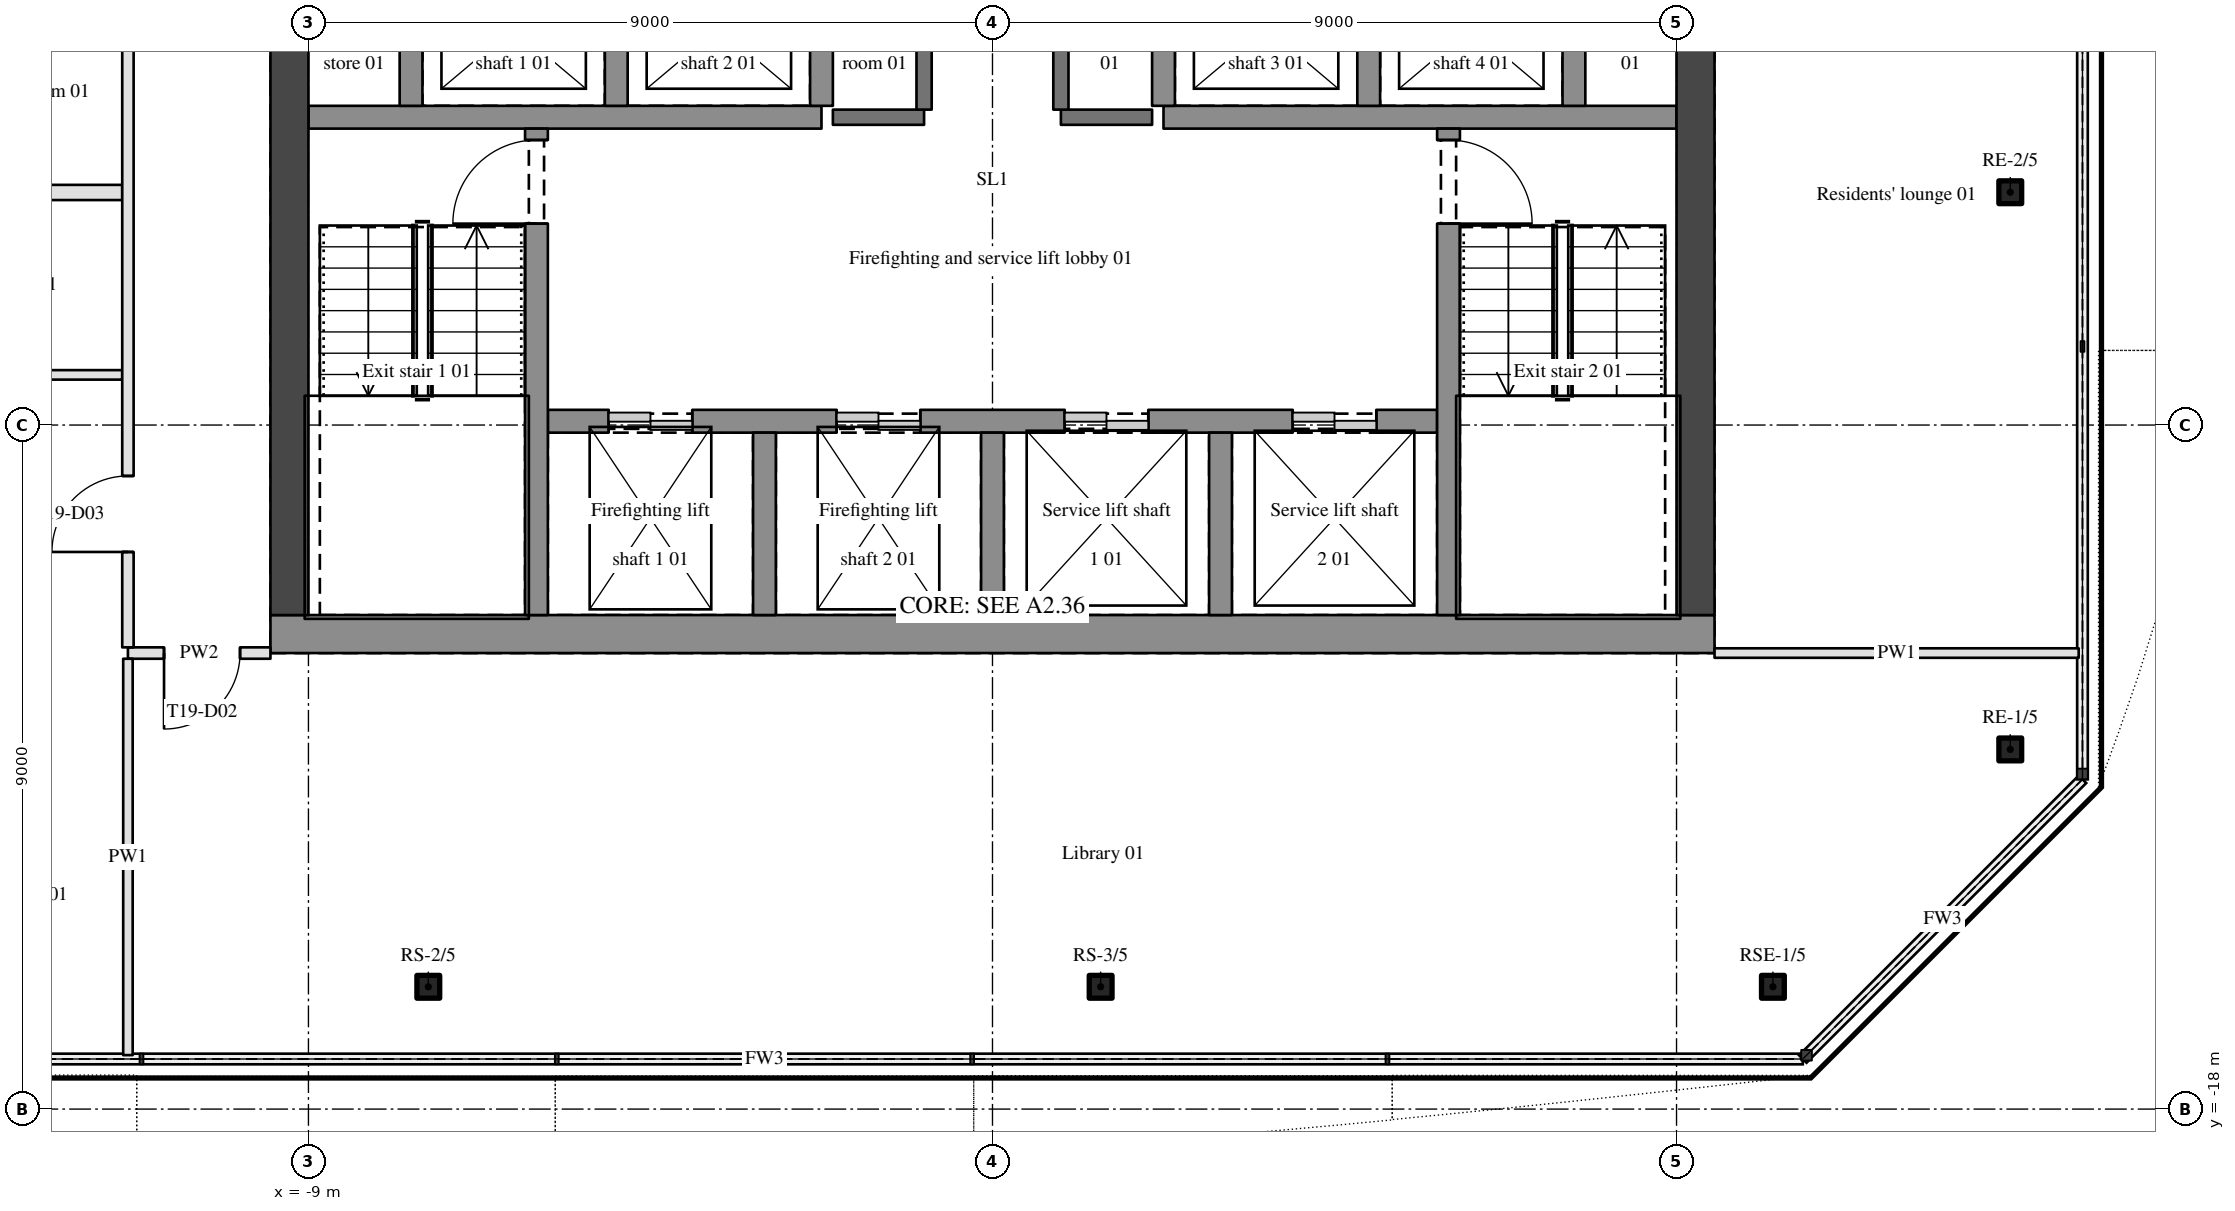
"""IFC4 building model, lengths in metres.
Left out: names, types, materials, properties, quantities, classifications, styles, units other than length and angle.
Written with IfcOpenShell. Run it as: python <this file> out.ifc"""

import sys

from ifc_helpers import new_model, si_unit, direction, frame, frame_2d, origin, origin_2d, place, context, subcontext, project, spatial, rectangle, hollow_rectangle, extrude, element, fill, save


model = new_model("IFC4")
c1 = context("Model", 3, precision=1e-05, world=origin(), true_north=direction((0.0, 1.0)))
c2 = subcontext(c1, "Body", "Model", "MODEL_VIEW")
j1 = project(units=[si_unit("LENGTHUNIT", "METRE"), si_unit("PLANEANGLEUNIT", "RADIAN")], contexts=[c1])
p1 = place(None, origin())
s1 = spatial("IfcSite", under=j1, at=p1, CompositionType="ELEMENT")
p2 = place(p1, origin())
s2 = spatial("IfcBuilding", under=s1, at=p2, CompositionType="ELEMENT")
p3 = place(p2, frame((0.0, 0.0, 251.85)))
s3 = spatial("IfcBuildingStorey", under=s2, at=p3, CompositionType="ELEMENT", Elevation=251.85)
for number, where, z_axis, x_axis in (
    (1, (-7.423, -16.391, 0.0), (0.0, 0.0, 1.0), (1.0, 0.0, 0.0)),
    (2, (1.423, -16.391, 0.0), (0.0, 0.0, 1.0), (1.0, 0.0, 0.0)),
    (3, (10.268, -16.391, 0.0), (0.0, 0.0, 1.0), (1.0, 0.0, 0.0)),
    (4, (13.391, -13.268, 0.0), (0.0, 0.0, 1.0), (1.0, 0.0, 0.0)),
    (5, (13.391, -5.937, 0.0), (0.0, 0.0, 1.0), (1.0, 0.0, 0.0)),
):
    element("IfcColumn", number, at=place(p3, frame(where, z_axis=z_axis, x_axis=x_axis)), inside=s3, PredefinedType="COLUMN", context=c2, shape_type="SweptSolid", body=[
        extrude(hollow_rectangle(XDim=0.3, YDim=0.3, WallThickness=0.02, InnerFilletRadius=0.03, OuterFilletRadius=0.05, at=origin_2d()), origin(), (0.0, 0.0, 1.0), 3.15),
    ])
p4 = place(p3, frame((-9.5, -11.75, 0.0), z_axis=(0.0, 0.0, 1.0), x_axis=(1.0, 0.0, 0.0)))
e6 = element("IfcWall", 6, at=p4, inside=s3, PredefinedType="SHEAR", context=c2, shape_type="SweptSolid", body=[
    extrude(rectangle(XDim=19.0, YDim=0.5, at=frame_2d((9.5, 0.0))), origin(), (0.0, 0.0, 1.0), 3.15),
])
p5 = place(p3, frame((-9.25, -11.5, 0.0), z_axis=(0.0, 0.0, 1.0), x_axis=(0.0, 1.0, 0.0)))
e7 = element("IfcWall", 7, at=p5, inside=s3, PredefinedType="SHEAR", context=c2, shape_type="SweptSolid", body=[
    extrude(rectangle(XDim=11.65, YDim=0.5, at=frame_2d((5.825, 0.0))), origin(), (0.0, 0.0, 1.0), 3.15),
])
p6 = place(p5, frame((9.4, 0.0, 0.0)))
e8 = element("IfcOpeningElement", 8, at=p6, cuts=e7, PredefinedType="OPENING", context=c2, shape_type="SweptSolid", body=[
    extrude(rectangle(XDim=1.8, YDim=2.1, at=frame_2d((0.9, 1.05))), frame((0.0, 0.26, 0.0), z_axis=(0.0, -1.0, 0.0), x_axis=(1.0, 0.0, 0.0)), (0.0, 0.0, 1.0), 0.52),
])
p7 = place(p3, frame((9.25, -11.5, 0.0), z_axis=(0.0, 0.0, 1.0), x_axis=(0.0, 1.0, 0.0)))
e9 = element("IfcWall", 9, at=p7, inside=s3, PredefinedType="SHEAR", context=c2, shape_type="SweptSolid", body=[
    extrude(rectangle(XDim=11.65, YDim=0.5, at=frame_2d((5.825, 0.0))), origin(), (0.0, 0.0, 1.0), 3.15),
])
p8 = place(p3, frame((-9.5, -12.0, 0.0), z_axis=(0.0, 0.0, 1.0), x_axis=(-1.0, 0.0, 0.0)))
e10 = element("IfcWall", 10, at=p8, inside=s3, PredefinedType="PARTITIONING", context=c2, shape_type="SweptSolid", body=[
    extrude(rectangle(XDim=1.875, YDim=0.15, at=frame_2d((0.938, 0.0))), origin(), (0.0, 0.0, 1.0), 2.21),
])
p9 = place(p8, frame((0.4, 0.0, 0.0)))
e11 = element("IfcOpeningElement", 11, at=p9, cuts=e10, PredefinedType="OPENING", context=c2, shape_type="SweptSolid", body=[
    extrude(rectangle(XDim=1.0, YDim=2.1, at=frame_2d((0.5, 1.05))), frame((0.0, 0.085, 0.0), z_axis=(0.0, -1.0, 0.0), x_axis=(1.0, 0.0, 0.0)), (0.0, 0.0, 1.0), 0.17),
])
p10 = place(p3, frame((9.5, -12.0, 0.0), z_axis=(0.0, 0.0, 1.0), x_axis=(1.0, 0.0, 0.0)))
e12 = element("IfcWall", 12, at=p10, inside=s3, PredefinedType="PARTITIONING", context=c2, shape_type="SweptSolid", body=[
    extrude(rectangle(XDim=4.791, YDim=0.125, at=frame_2d((2.396, 0.0))), origin(), (0.0, 0.0, 1.0), 2.21),
])
p11 = place(p3, frame((-5.85, -8.95, 0.0), z_axis=(0.0, 0.0, 1.0), x_axis=(1.0, 0.0, 0.0)))
e13 = element("IfcWall", 13, at=p11, inside=s3, PredefinedType="SHEAR", context=c2, shape_type="SweptSolid", body=[
    extrude(rectangle(XDim=11.7, YDim=0.3, at=frame_2d((5.85, 0.0))), origin(), (0.0, 0.0, 1.0), 3.15),
])
p12 = place(p11, frame((0.8, 0.0, 0.0)))
e14 = element("IfcOpeningElement", 14, at=p12, cuts=e13, PredefinedType="OPENING", context=c2, shape_type="SweptSolid", body=[
    extrude(rectangle(XDim=1.1, YDim=2.1, at=frame_2d((0.55, 1.05))), frame((0.0, 0.16, 0.0), z_axis=(0.0, -1.0, 0.0), x_axis=(1.0, 0.0, 0.0)), (0.0, 0.0, 1.0), 0.32),
])
p13 = place(p11, frame((3.8, 0.0, 0.0)))
e15 = element("IfcOpeningElement", 15, at=p13, cuts=e13, PredefinedType="OPENING", context=c2, shape_type="SweptSolid", body=[
    extrude(rectangle(XDim=1.1, YDim=2.1, at=frame_2d((0.55, 1.05))), frame((0.0, 0.16, 0.0), z_axis=(0.0, -1.0, 0.0), x_axis=(1.0, 0.0, 0.0)), (0.0, 0.0, 1.0), 0.32),
])
p14 = place(p11, frame((6.8, 0.0, 0.0)))
e16 = element("IfcOpeningElement", 16, at=p14, cuts=e13, PredefinedType="OPENING", context=c2, shape_type="SweptSolid", body=[
    extrude(rectangle(XDim=1.1, YDim=2.1, at=frame_2d((0.55, 1.05))), frame((0.0, 0.16, 0.0), z_axis=(0.0, -1.0, 0.0), x_axis=(1.0, 0.0, 0.0)), (0.0, 0.0, 1.0), 0.32),
])
p15 = place(p11, frame((9.8, 0.0, 0.0)))
e17 = element("IfcOpeningElement", 17, at=p15, cuts=e13, PredefinedType="OPENING", context=c2, shape_type="SweptSolid", body=[
    extrude(rectangle(XDim=1.1, YDim=2.1, at=frame_2d((0.55, 1.05))), frame((0.0, 0.16, 0.0), z_axis=(0.0, -1.0, 0.0), x_axis=(1.0, 0.0, 0.0)), (0.0, 0.0, 1.0), 0.32),
])
p16 = place(p3, frame((-14.512, -8.34, 0.0), z_axis=(0.0, 0.0, 1.0), x_axis=(1.0, 0.0, 0.0)))
e18 = element("IfcWall", 18, at=p16, inside=s3, PredefinedType="PARTITIONING", context=c2, shape_type="SweptSolid", body=[
    extrude(rectangle(XDim=3.062, YDim=0.125, at=frame_2d((1.531, 0.0))), origin(), (0.0, 0.0, 1.0), 2.21),
])
p17 = place(p16, frame((1.087, 0.0, 0.0)))
e19 = element("IfcOpeningElement", 19, at=p17, cuts=e18, PredefinedType="OPENING", context=c2, shape_type="SweptSolid", body=[
    extrude(rectangle(XDim=0.9, YDim=2.1, at=frame_2d((0.45, 1.05))), frame((0.0, 0.073, 0.0), z_axis=(0.0, -1.0, 0.0), x_axis=(1.0, 0.0, 0.0)), (0.0, 0.0, 1.0), 0.145),
])
p18 = place(p3, frame((-19.241, -5.94, 0.0), z_axis=(0.0, 0.0, 1.0), x_axis=(1.0, 0.0, 0.0)))
e20 = element("IfcWall", 20, at=p18, inside=s3, PredefinedType="PARTITIONING", context=c2, shape_type="SweptSolid", body=[
    extrude(rectangle(XDim=7.791, YDim=0.2, at=frame_2d((3.896, 0.0))), origin(), (0.0, 0.0, 1.0), 2.21),
])
p19 = place(p3, frame((-9.0, -4.95, 0.0), z_axis=(0.0, 0.0, 1.0), x_axis=(1.0, 0.0, 0.0)))
e21 = element("IfcWall", 21, at=p19, inside=s3, PredefinedType="SHEAR", context=c2, shape_type="SweptSolid", body=[
    extrude(rectangle(XDim=6.75, YDim=0.3, at=frame_2d((3.375, 0.0))), origin(), (0.0, 0.0, 1.0), 3.15),
])
for number, where, z_axis, x_axis in (
    (22, (-2.1, -4.95, 0.0), (0.0, 0.0, 1.0), (1.0, 0.0, 0.0)),
    (23, (0.9, -4.95, 0.0), (0.0, 0.0, 1.0), (1.0, 0.0, 0.0)),
):
    element("IfcWall", number, at=place(p3, frame(where, z_axis=z_axis, x_axis=x_axis)), inside=s3, PredefinedType="SOLIDWALL", context=c2, shape_type="SweptSolid", body=[
        extrude(rectangle(XDim=1.2, YDim=0.2, at=frame_2d((0.6, 0.0))), origin(), (0.0, 0.0, 1.0), 2.85),
    ])
p20 = place(p3, frame((2.25, -4.95, 0.0), z_axis=(0.0, 0.0, 1.0), x_axis=(1.0, 0.0, 0.0)))
e24 = element("IfcWall", 24, at=p20, inside=s3, PredefinedType="SHEAR", context=c2, shape_type="SweptSolid", body=[
    extrude(rectangle(XDim=6.75, YDim=0.3, at=frame_2d((3.375, 0.0))), origin(), (0.0, 0.0, 1.0), 3.15),
])
p21 = place(p3, frame((-11.375, -17.29, 0.0), z_axis=(0.0, 0.0, 1.0), x_axis=(0.0, 1.0, 0.0)))
e25 = element("IfcWall", 25, at=p21, inside=s3, PredefinedType="PARTITIONING", context=c2, shape_type="SweptSolid", body=[
    extrude(rectangle(XDim=5.215, YDim=0.125, at=frame_2d((2.607, 0.0))), origin(), (0.0, 0.0, 1.0), 2.21),
])
p22 = place(p3, frame((-11.375, -11.925, 0.0), z_axis=(0.0, 0.0, 1.0), x_axis=(0.0, 1.0, 0.0)))
e26 = element("IfcWall", 26, at=p22, inside=s3, PredefinedType="PARTITIONING", context=c2, shape_type="SweptSolid", body=[
    extrude(rectangle(XDim=23.25, YDim=0.15, at=frame_2d((11.625, 0.0))), origin(), (0.0, 0.0, 1.0), 2.21),
])
p23 = place(p22, frame((1.255, 0.0, 0.0)))
e27 = element("IfcOpeningElement", 27, at=p23, cuts=e26, PredefinedType="OPENING", context=c2, shape_type="SweptSolid", body=[
    extrude(rectangle(XDim=1.0, YDim=2.1, at=frame_2d((0.5, 1.05))), frame((0.0, 0.085, 0.0), z_axis=(0.0, -1.0, 0.0), x_axis=(1.0, 0.0, 0.0)), (0.0, 0.0, 1.0), 0.17),
])
p24 = place(p22, frame((15.742, 0.0, 0.0)))
e28 = element("IfcOpeningElement", 28, at=p24, cuts=e26, PredefinedType="OPENING", context=c2, shape_type="SweptSolid", body=[
    extrude(rectangle(XDim=1.0, YDim=2.1, at=frame_2d((0.5, 1.05))), frame((0.0, 0.085, 0.0), z_axis=(0.0, -1.0, 0.0), x_axis=(1.0, 0.0, 0.0)), (0.0, 0.0, 1.0), 0.17),
])
p25 = place(p3, frame((-7.65, -4.8, 0.0), z_axis=(0.0, 0.0, 1.0), x_axis=(0.0, 1.0, 0.0)))
e29 = element("IfcWall", 29, at=p25, inside=s3, PredefinedType="SHEAR", context=c2, shape_type="SweptSolid", body=[
    extrude(rectangle(XDim=2.05, YDim=0.3, at=frame_2d((1.025, 0.0))), origin(), (0.0, 0.0, 1.0), 3.15),
])
p26 = place(p3, frame((-6.0, -11.5, 0.0), z_axis=(0.0, 0.0, 1.0), x_axis=(0.0, 1.0, 0.0)))
e30 = element("IfcWall", 30, at=p26, inside=s3, PredefinedType="SHEAR", context=c2, shape_type="SweptSolid", body=[
    extrude(rectangle(XDim=6.4, YDim=0.3, at=frame_2d((3.2, 0.0))), origin(), (0.0, 0.0, 1.0), 3.15),
])
p27 = place(p26, frame((5.15, 0.0, 0.0)))
e31 = element("IfcOpeningElement", 31, at=p27, cuts=e30, PredefinedType="OPENING", context=c2, shape_type="SweptSolid", body=[
    extrude(rectangle(XDim=1.1, YDim=2.1, at=frame_2d((0.55, 1.05))), frame((0.0, 0.16, 0.0), z_axis=(0.0, -1.0, 0.0), x_axis=(1.0, 0.0, 0.0)), (0.0, 0.0, 1.0), 0.32),
])
p28 = place(p3, frame((-4.95, -4.8, 0.0), z_axis=(0.0, 0.0, 1.0), x_axis=(0.0, 1.0, 0.0)))
e32 = element("IfcWall", 32, at=p28, inside=s3, PredefinedType="SHEAR", context=c2, shape_type="SweptSolid", body=[
    extrude(rectangle(XDim=2.05, YDim=0.3, at=frame_2d((1.025, 0.0))), origin(), (0.0, 0.0, 1.0), 3.15),
])
p29 = place(p3, frame((-3.0, -11.5, 0.0), z_axis=(0.0, 0.0, 1.0), x_axis=(0.0, 1.0, 0.0)))
e33 = element("IfcWall", 33, at=p29, inside=s3, PredefinedType="SHEAR", context=c2, shape_type="SweptSolid", body=[
    extrude(rectangle(XDim=2.4, YDim=0.3, at=frame_2d((1.2, 0.0))), origin(), (0.0, 0.0, 1.0), 3.15),
])
p30 = place(p3, frame((-2.25, -4.8, 0.0), z_axis=(0.0, 0.0, 1.0), x_axis=(0.0, 1.0, 0.0)))
e34 = element("IfcWall", 34, at=p30, inside=s3, PredefinedType="SHEAR", context=c2, shape_type="SweptSolid", body=[
    extrude(rectangle(XDim=2.05, YDim=0.3, at=frame_2d((1.025, 0.0))), origin(), (0.0, 0.0, 1.0), 3.15),
])
p31 = place(p3, frame((-0.9, -4.85, 0.0), z_axis=(0.0, 0.0, 1.0), x_axis=(0.0, 1.0, 0.0)))
e35 = element("IfcWall", 35, at=p31, inside=s3, PredefinedType="SOLIDWALL", context=c2, shape_type="SweptSolid", body=[
    extrude(rectangle(XDim=2.15, YDim=0.2, at=frame_2d((1.075, 0.0))), origin(), (0.0, 0.0, 1.0), 2.85),
])
p32 = place(p3, frame((0.0, -11.5, 0.0), z_axis=(0.0, 0.0, 1.0), x_axis=(0.0, 1.0, 0.0)))
e36 = element("IfcWall", 36, at=p32, inside=s3, PredefinedType="SHEAR", context=c2, shape_type="SweptSolid", body=[
    extrude(rectangle(XDim=2.4, YDim=0.3, at=frame_2d((1.2, 0.0))), origin(), (0.0, 0.0, 1.0), 3.15),
])
p33 = place(p3, frame((0.9, -4.85, 0.0), z_axis=(0.0, 0.0, 1.0), x_axis=(0.0, 1.0, 0.0)))
e37 = element("IfcWall", 37, at=p33, inside=s3, PredefinedType="SOLIDWALL", context=c2, shape_type="SweptSolid", body=[
    extrude(rectangle(XDim=2.15, YDim=0.2, at=frame_2d((1.075, 0.0))), origin(), (0.0, 0.0, 1.0), 2.85),
])
p34 = place(p3, frame((2.25, -4.8, 0.0), z_axis=(0.0, 0.0, 1.0), x_axis=(0.0, 1.0, 0.0)))
e38 = element("IfcWall", 38, at=p34, inside=s3, PredefinedType="SHEAR", context=c2, shape_type="SweptSolid", body=[
    extrude(rectangle(XDim=2.05, YDim=0.3, at=frame_2d((1.025, 0.0))), origin(), (0.0, 0.0, 1.0), 3.15),
])
p35 = place(p3, frame((3.0, -11.5, 0.0), z_axis=(0.0, 0.0, 1.0), x_axis=(0.0, 1.0, 0.0)))
e39 = element("IfcWall", 39, at=p35, inside=s3, PredefinedType="SHEAR", context=c2, shape_type="SweptSolid", body=[
    extrude(rectangle(XDim=2.4, YDim=0.3, at=frame_2d((1.2, 0.0))), origin(), (0.0, 0.0, 1.0), 3.15),
])
p36 = place(p3, frame((4.95, -4.8, 0.0), z_axis=(0.0, 0.0, 1.0), x_axis=(0.0, 1.0, 0.0)))
e40 = element("IfcWall", 40, at=p36, inside=s3, PredefinedType="SHEAR", context=c2, shape_type="SweptSolid", body=[
    extrude(rectangle(XDim=2.05, YDim=0.3, at=frame_2d((1.025, 0.0))), origin(), (0.0, 0.0, 1.0), 3.15),
])
p37 = place(p3, frame((6.0, -5.1, 0.0), z_axis=(0.0, 0.0, 1.0), x_axis=(0.0, -1.0, 0.0)))
e41 = element("IfcWall", 41, at=p37, inside=s3, PredefinedType="SHEAR", context=c2, shape_type="SweptSolid", body=[
    extrude(rectangle(XDim=6.4, YDim=0.3, at=frame_2d((3.2, 0.0))), origin(), (0.0, 0.0, 1.0), 3.15),
])
p38 = place(p37, frame((0.15, 0.0, 0.0)))
e42 = element("IfcOpeningElement", 42, at=p38, cuts=e41, PredefinedType="OPENING", context=c2, shape_type="SweptSolid", body=[
    extrude(rectangle(XDim=1.1, YDim=2.1, at=frame_2d((0.55, 1.05))), frame((0.0, 0.16, 0.0), z_axis=(0.0, -1.0, 0.0), x_axis=(1.0, 0.0, 0.0)), (0.0, 0.0, 1.0), 0.32),
])
p39 = place(p3, frame((7.65, -4.8, 0.0), z_axis=(0.0, 0.0, 1.0), x_axis=(0.0, 1.0, 0.0)))
e43 = element("IfcWall", 43, at=p39, inside=s3, PredefinedType="SHEAR", context=c2, shape_type="SweptSolid", body=[
    extrude(rectangle(XDim=2.05, YDim=0.3, at=frame_2d((1.025, 0.0))), origin(), (0.0, 0.0, 1.0), 3.15),
])
p40 = place(p23, origin())
e44 = element("IfcDoor", 44, at=p40, inside=s3, OperationType="SINGLE_SWING_LEFT", PredefinedType="DOOR", context=c2, shape_type="SweptSolid", body=[
    extrude(rectangle(XDim=1.0, YDim=2.1, at=frame_2d((0.5, 1.05))), frame((0.0, 0.025, 0.0), z_axis=(0.0, -1.0, 0.0), x_axis=(1.0, 0.0, 0.0)), (0.0, 0.0, 1.0), 0.05),
])
fill(e27, e44)
p41 = place(p27, origin())
e45 = element("IfcDoor", 45, at=p41, inside=s3, OperationType="SINGLE_SWING_LEFT", PredefinedType="DOOR", context=c2, shape_type="SweptSolid", body=[
    extrude(rectangle(XDim=1.1, YDim=2.1, at=frame_2d((0.55, 1.05))), frame((0.0, 0.025, 0.0), z_axis=(0.0, -1.0, 0.0), x_axis=(1.0, 0.0, 0.0)), (0.0, 0.0, 1.0), 0.05),
])
fill(e31, e45)
p42 = place(p38, origin())
e46 = element("IfcDoor", 46, at=p42, inside=s3, OperationType="SINGLE_SWING_RIGHT", PredefinedType="DOOR", context=c2, shape_type="SweptSolid", body=[
    extrude(rectangle(XDim=1.1, YDim=2.1, at=frame_2d((0.55, 1.05))), frame((0.0, 0.025, 0.0), z_axis=(0.0, -1.0, 0.0), x_axis=(1.0, 0.0, 0.0)), (0.0, 0.0, 1.0), 0.05),
])
fill(e42, e46)
p43 = place(p9, origin())
e47 = element("IfcDoor", 47, at=p43, inside=s3, OperationType="SINGLE_SWING_RIGHT", PredefinedType="DOOR", context=c2, shape_type="SweptSolid", body=[
    extrude(rectangle(XDim=1.0, YDim=2.1, at=frame_2d((0.5, 1.05))), frame((0.0, 0.025, 0.0), z_axis=(0.0, -1.0, 0.0), x_axis=(1.0, 0.0, 0.0)), (0.0, 0.0, 1.0), 0.05),
])
fill(e11, e47)
p44 = place(p12, origin())
e48 = element("IfcDoor", 48, at=p44, inside=s3, OperationType="DOUBLE_DOOR_SLIDING", PredefinedType="DOOR", context=c2, shape_type="SweptSolid", body=[
    extrude(rectangle(XDim=1.1, YDim=2.1, at=frame_2d((0.55, 1.05))), frame((0.0, 0.025, 0.0), z_axis=(0.0, -1.0, 0.0), x_axis=(1.0, 0.0, 0.0)), (0.0, 0.0, 1.0), 0.05),
])
fill(e14, e48)
p45 = place(p13, origin())
e49 = element("IfcDoor", 49, at=p45, inside=s3, OperationType="DOUBLE_DOOR_SLIDING", PredefinedType="DOOR", context=c2, shape_type="SweptSolid", body=[
    extrude(rectangle(XDim=1.1, YDim=2.1, at=frame_2d((0.55, 1.05))), frame((0.0, 0.025, 0.0), z_axis=(0.0, -1.0, 0.0), x_axis=(1.0, 0.0, 0.0)), (0.0, 0.0, 1.0), 0.05),
])
fill(e15, e49)
p46 = place(p14, origin())
e50 = element("IfcDoor", 50, at=p46, inside=s3, OperationType="DOUBLE_DOOR_SLIDING", PredefinedType="DOOR", context=c2, shape_type="SweptSolid", body=[
    extrude(rectangle(XDim=1.1, YDim=2.1, at=frame_2d((0.55, 1.05))), frame((0.0, 0.025, 0.0), z_axis=(0.0, -1.0, 0.0), x_axis=(1.0, 0.0, 0.0)), (0.0, 0.0, 1.0), 0.05),
])
fill(e16, e50)
p47 = place(p15, origin())
e51 = element("IfcDoor", 51, at=p47, inside=s3, OperationType="DOUBLE_DOOR_SLIDING", PredefinedType="DOOR", context=c2, shape_type="SweptSolid", body=[
    extrude(rectangle(XDim=1.1, YDim=2.1, at=frame_2d((0.55, 1.05))), frame((0.0, 0.025, 0.0), z_axis=(0.0, -1.0, 0.0), x_axis=(1.0, 0.0, 0.0)), (0.0, 0.0, 1.0), 0.05),
])
fill(e17, e51)
save(model, sys.argv[1])
